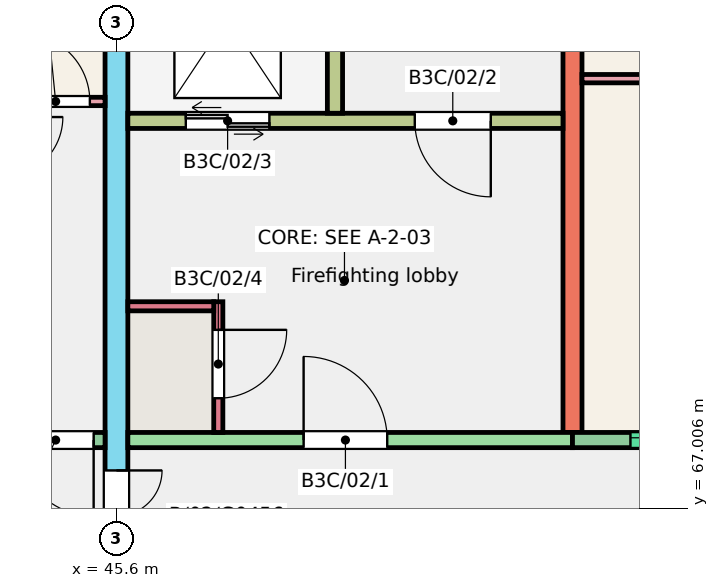
"""IFC4 building model, lengths in metres.
Left out: names, types, materials, properties, quantities, classifications, styles, units other than length and angle.
Written with IfcOpenShell. Run it as: python <this file> out.ifc"""

import sys

from ifc_helpers import new_model, si_unit, direction, frame, frame_2d, origin, place, context, subcontext, project, spatial, rectangle, extrude, element, fill, save


model = new_model("IFC4")
c1 = context("Model", 3, precision=1e-05, world=origin(), true_north=direction((0.0, 1.0)))
c2 = subcontext(c1, "Body", "Model", "MODEL_VIEW")
j1 = project(units=[si_unit("LENGTHUNIT", "METRE"), si_unit("PLANEANGLEUNIT", "RADIAN")], contexts=[c1])
p1 = place(None, origin())
s1 = spatial("IfcSite", under=j1, at=p1, CompositionType="ELEMENT")
p2 = place(p1, origin())
s2 = spatial("IfcBuilding", under=s1, at=p2, CompositionType="ELEMENT")
p3 = place(p2, frame((0.0, 0.0, 6.0)))
s3 = spatial("IfcBuildingStorey", under=s2, at=p3, CompositionType="ELEMENT", Elevation=6.0)
p4 = place(p3, frame((45.6, 66.0, 0.0), z_axis=(0.0, 0.0, 1.0), x_axis=(0.0, 1.0, 0.0)))
e1 = element("IfcWall", 1, at=p4, inside=s3, PredefinedType="SHEAR", context=c2, shape_type="SweptSolid", body=[
    extrude(rectangle(XDim=11.0, YDim=0.3, at=frame_2d((5.5, 0.0))), origin(), (0.0, 0.0, 1.0), 3.0),
])
p5 = place(p4, frame((0.3, 0.0, 0.0)))
e2 = element("IfcOpeningElement", 2, at=p5, cuts=e1, PredefinedType="OPENING", context=c2, shape_type="SweptSolid", body=[
    extrude(rectangle(XDim=1.2, YDim=2.1, at=frame_2d((0.6, 1.05))), frame((0.0, 0.16, 0.0), z_axis=(0.0, -1.0, 0.0), x_axis=(1.0, 0.0, 0.0)), (0.0, 0.0, 1.0), 0.32),
])
p6 = place(p3, frame((51.6, 68.0, 0.0), z_axis=(0.0, 0.0, 1.0), x_axis=(0.0, 1.0, 0.0)))
e3 = element("IfcWall", 3, at=p6, inside=s3, PredefinedType="SHEAR", context=c2, shape_type="SweptSolid", body=[
    extrude(rectangle(XDim=9.0, YDim=0.25, at=frame_2d((4.5, 0.0))), origin(), (0.0, 0.0, 1.0), 3.0),
])
p7 = place(p3, frame((42.0, 67.9, 0.0), z_axis=(0.0, 0.0, 1.0), x_axis=(1.0, 0.0, 0.0)))
e4 = element("IfcWall", 4, at=p7, inside=s3, PredefinedType="SOLIDWALL", context=c2, shape_type="SweptSolid", body=[
    extrude(rectangle(XDim=3.45, YDim=0.2, at=frame_2d((1.725, 0.0))), origin(), (0.0, 0.0, 1.0), 3.0),
])
p8 = place(p7, frame((0.47, 0.0, 1.1)))
e5 = element("IfcOpeningElement", 5, at=p8, cuts=e4, PredefinedType="OPENING", context=c2, shape_type="SweptSolid", body=[
    extrude(rectangle(XDim=1.2, YDim=1.3, at=frame_2d((0.6, 0.65))), frame((0.0, 0.11, 0.0), z_axis=(0.0, -1.0, 0.0), x_axis=(1.0, 0.0, 0.0)), (0.0, 0.0, 1.0), 0.22),
])
p9 = place(p7, frame((2.3, 0.0, 0.0)))
e6 = element("IfcOpeningElement", 6, at=p9, cuts=e4, PredefinedType="OPENING", context=c2, shape_type="SweptSolid", body=[
    extrude(rectangle(XDim=1.0, YDim=2.1, at=frame_2d((0.5, 1.05))), frame((0.0, 0.11, 0.0), z_axis=(0.0, -1.0, 0.0), x_axis=(1.0, 0.0, 0.0)), (0.0, 0.0, 1.0), 0.22),
])
p10 = place(p3, frame((45.75, 67.9, 0.0), z_axis=(0.0, 0.0, 1.0), x_axis=(1.0, 0.0, 0.0)))
e7 = element("IfcWall", 7, at=p10, inside=s3, PredefinedType="SHEAR", context=c2, shape_type="SweptSolid", body=[
    extrude(rectangle(XDim=5.85, YDim=0.2, at=frame_2d((2.925, 0.0))), origin(), (0.0, 0.0, 1.0), 3.0),
])
p11 = place(p10, frame((2.312, 0.0, 0.0)))
e8 = element("IfcOpeningElement", 8, at=p11, cuts=e7, PredefinedType="OPENING", context=c2, shape_type="SweptSolid", body=[
    extrude(rectangle(XDim=1.1, YDim=2.1, at=frame_2d((0.55, 1.05))), frame((0.0, 0.11, 0.0), z_axis=(0.0, -1.0, 0.0), x_axis=(1.0, 0.0, 0.0)), (0.0, 0.0, 1.0), 0.22),
])
p12 = place(p3, frame((45.75, 72.1, 0.0), z_axis=(0.0, 0.0, 1.0), x_axis=(1.0, 0.0, 0.0)))
e9 = element("IfcWall", 9, at=p12, inside=s3, PredefinedType="SHEAR", context=c2, shape_type="SweptSolid", body=[
    extrude(rectangle(XDim=5.725, YDim=0.2, at=frame_2d((2.863, 0.0))), origin(), (0.0, 0.0, 1.0), 3.0),
])
p13 = place(p12, frame((3.775, 0.0, 0.0)))
e10 = element("IfcOpeningElement", 10, at=p13, cuts=e9, PredefinedType="OPENING", context=c2, shape_type="SweptSolid", body=[
    extrude(rectangle(XDim=1.0, YDim=2.1, at=frame_2d((0.5, 1.05))), frame((0.0, 0.11, 0.0), z_axis=(0.0, -1.0, 0.0), x_axis=(1.0, 0.0, 0.0)), (0.0, 0.0, 1.0), 0.22),
])
p14 = place(p12, frame((0.762, 0.0, 0.0)))
e11 = element("IfcOpeningElement", 11, at=p14, cuts=e9, PredefinedType="OPENING", context=c2, shape_type="SweptSolid", body=[
    extrude(rectangle(XDim=1.1, YDim=2.1, at=frame_2d((0.55, 1.05))), frame((0.0, 0.11, 0.0), z_axis=(0.0, -1.0, 0.0), x_axis=(1.0, 0.0, 0.0)), (0.0, 0.0, 1.0), 0.22),
])
p15 = place(p3, frame((48.475, 72.2, 0.0), z_axis=(0.0, 0.0, 1.0), x_axis=(0.0, 1.0, 0.0)))
e12 = element("IfcWall", 12, at=p15, inside=s3, PredefinedType="SHEAR", context=c2, shape_type="SweptSolid", body=[
    extrude(rectangle(XDim=4.8, YDim=0.2, at=frame_2d((2.4, 0.0))), origin(), (0.0, 0.0, 1.0), 3.0),
])
p16 = place(p3, frame((46.94, 68.0, 0.0), z_axis=(0.0, 0.0, 1.0), x_axis=(0.0, 1.0, 0.0)))
e13 = element("IfcWall", 13, at=p16, inside=s3, PredefinedType="SHEAR", context=c2, shape_type="SweptSolid", body=[
    extrude(rectangle(XDim=1.72, YDim=0.12, at=frame_2d((0.86, 0.0))), origin(), (0.0, 0.0, 1.0), 3.0),
])
p17 = place(p16, frame((0.45, 0.0, 0.0)))
e14 = element("IfcOpeningElement", 14, at=p17, cuts=e13, PredefinedType="OPENING", context=c2, shape_type="SweptSolid", body=[
    extrude(rectangle(XDim=0.9, YDim=2.1, at=frame_2d((0.45, 1.05))), frame((0.0, 0.07, 0.0), z_axis=(0.0, -1.0, 0.0), x_axis=(1.0, 0.0, 0.0)), (0.0, 0.0, 1.0), 0.14),
])
p18 = place(p3, frame((45.75, 69.66, 0.0), z_axis=(0.0, 0.0, 1.0), x_axis=(1.0, 0.0, 0.0)))
e15 = element("IfcWall", 15, at=p18, inside=s3, PredefinedType="SHEAR", context=c2, shape_type="SweptSolid", body=[
    extrude(rectangle(XDim=1.13, YDim=0.12, at=frame_2d((0.565, 0.0))), origin(), (0.0, 0.0, 1.0), 3.0),
])
p19 = place(p3, frame((51.6, 67.9, 0.0), z_axis=(0.0, 0.0, 1.0), x_axis=(1.0, 0.0, 0.0)))
e16 = element("IfcWall", 16, at=p19, inside=s3, PredefinedType="SOLIDWALL", context=c2, shape_type="SweptSolid", body=[
    extrude(rectangle(XDim=3.6, YDim=0.2, at=frame_2d((1.8, 0.0))), origin(), (0.0, 0.0, 1.0), 3.0),
])
p20 = place(p19, frame((0.762, 0.0, 1.2)))
e17 = element("IfcOpeningElement", 17, at=p20, cuts=e16, PredefinedType="OPENING", context=c2, shape_type="SweptSolid", body=[
    extrude(rectangle(XDim=2.1, YDim=1.2, at=frame_2d((1.05, 0.6))), frame((0.0, 0.11, 0.0), z_axis=(0.0, -1.0, 0.0), x_axis=(1.0, 0.0, 0.0)), (0.0, 0.0, 1.0), 0.22),
])
p21 = place(p3, frame((42.1, 72.355, 0.0), z_axis=(0.0, 0.0, 1.0), x_axis=(1.0, 0.0, 0.0)))
e18 = element("IfcWall", 18, at=p21, inside=s3, PredefinedType="PARTITIONING", context=c2, shape_type="SweptSolid", body=[
    extrude(rectangle(XDim=3.35, YDim=0.11, at=frame_2d((1.675, 0.0))), origin(), (0.0, 0.0, 1.0), 2.8),
])
p22 = place(p21, frame((2.25, 0.0, 0.0)))
e19 = element("IfcOpeningElement", 19, at=p22, cuts=e18, PredefinedType="OPENING", context=c2, shape_type="SweptSolid", body=[
    extrude(rectangle(XDim=0.9, YDim=2.1, at=frame_2d((0.45, 1.05))), frame((0.0, 0.065, 0.0), z_axis=(0.0, -1.0, 0.0), x_axis=(1.0, 0.0, 0.0)), (0.0, 0.0, 1.0), 0.13),
])
p23 = place(p3, frame((51.725, 72.655, 0.0), z_axis=(0.0, 0.0, 1.0), x_axis=(1.0, 0.0, 0.0)))
e20 = element("IfcWall", 20, at=p23, inside=s3, PredefinedType="PARTITIONING", context=c2, shape_type="SweptSolid", body=[
    extrude(rectangle(XDim=3.375, YDim=0.11, at=frame_2d((1.688, 0.0))), origin(), (0.0, 0.0, 1.0), 2.8),
])
p24 = place(p20, origin())
e21 = element("IfcWindow", 21, at=p24, inside=s3, PartitioningType="SINGLE_PANEL", PredefinedType="WINDOW", context=c2, shape_type="SweptSolid", body=[
    extrude(rectangle(XDim=2.1, YDim=1.2, at=frame_2d((1.05, 0.6))), frame((0.0, 0.06, 0.0), z_axis=(0.0, -1.0, 0.0), x_axis=(1.0, 0.0, 0.0)), (0.0, 0.0, 1.0), 0.06),
])
fill(e17, e21)
p25 = place(p9, origin())
e22 = element("IfcDoor", 22, at=p25, inside=s3, OperationType="SINGLE_SWING_RIGHT", PredefinedType="DOOR", context=c2, shape_type="SweptSolid", body=[
    extrude(rectangle(XDim=1.0, YDim=2.1, at=frame_2d((0.5, 1.05))), frame((0.0, 0.025, 0.0), z_axis=(0.0, -1.0, 0.0), x_axis=(1.0, 0.0, 0.0)), (0.0, 0.0, 1.0), 0.05),
])
fill(e6, e22)
p26 = place(p22, origin())
e23 = element("IfcDoor", 23, at=p26, inside=s3, OperationType="SINGLE_SWING_LEFT", PredefinedType="DOOR", context=c2, shape_type="SweptSolid", body=[
    extrude(rectangle(XDim=0.9, YDim=2.1, at=frame_2d((0.45, 1.05))), frame((0.0, 0.025, 0.0), z_axis=(0.0, -1.0, 0.0), x_axis=(1.0, 0.0, 0.0)), (0.0, 0.0, 1.0), 0.05),
])
fill(e19, e23)
p27 = place(p11, origin())
e24 = element("IfcDoor", 24, at=p27, inside=s3, OperationType="SINGLE_SWING_LEFT", PredefinedType="DOOR", context=c2, shape_type="SweptSolid", body=[
    extrude(rectangle(XDim=1.1, YDim=2.1, at=frame_2d((0.55, 1.05))), frame((0.0, 0.025, 0.0), z_axis=(0.0, -1.0, 0.0), x_axis=(1.0, 0.0, 0.0)), (0.0, 0.0, 1.0), 0.05),
])
fill(e8, e24)
p28 = place(p13, origin())
e25 = element("IfcDoor", 25, at=p28, inside=s3, OperationType="SINGLE_SWING_RIGHT", PredefinedType="DOOR", context=c2, shape_type="SweptSolid", body=[
    extrude(rectangle(XDim=1.0, YDim=2.1, at=frame_2d((0.5, 1.05))), frame((0.0, 0.025, 0.0), z_axis=(0.0, -1.0, 0.0), x_axis=(1.0, 0.0, 0.0)), (0.0, 0.0, 1.0), 0.05),
])
fill(e10, e25)
p29 = place(p14, origin())
e26 = element("IfcDoor", 26, at=p29, inside=s3, OperationType="DOUBLE_DOOR_SLIDING", PredefinedType="DOOR", context=c2, shape_type="SweptSolid", body=[
    extrude(rectangle(XDim=1.1, YDim=2.1, at=frame_2d((0.55, 1.05))), frame((0.0, 0.025, 0.0), z_axis=(0.0, -1.0, 0.0), x_axis=(1.0, 0.0, 0.0)), (0.0, 0.0, 1.0), 0.05),
])
fill(e11, e26)
p30 = place(p17, origin())
e27 = element("IfcDoor", 27, at=p30, inside=s3, OperationType="SINGLE_SWING_RIGHT", PredefinedType="DOOR", context=c2, shape_type="SweptSolid", body=[
    extrude(rectangle(XDim=0.9, YDim=2.1, at=frame_2d((0.45, 1.05))), frame((0.0, 0.025, 0.0), z_axis=(0.0, -1.0, 0.0), x_axis=(1.0, 0.0, 0.0)), (0.0, 0.0, 1.0), 0.05),
])
fill(e14, e27)
p31 = place(p5, origin())
e28 = element("IfcDoor", 28, at=p31, inside=s3, OperationType="DOUBLE_DOOR_SINGLE_SWING", PredefinedType="DOOR", context=c2, shape_type="SweptSolid", body=[
    extrude(rectangle(XDim=1.2, YDim=2.1, at=frame_2d((0.6, 1.05))), frame((0.0, 0.025, 0.0), z_axis=(0.0, -1.0, 0.0), x_axis=(1.0, 0.0, 0.0)), (0.0, 0.0, 1.0), 0.05),
])
fill(e2, e28)
save(model, sys.argv[1])
